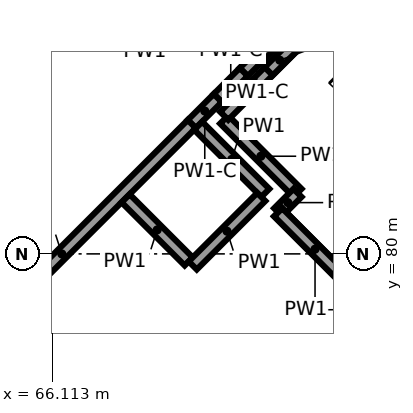
"""IFC4 building model, lengths in metres.
Left out: names, types, materials, properties, quantities, classifications, styles, units other than length and angle.
Written with IfcOpenShell. Run it as: python <this file> out.ifc"""

import sys

from ifc_helpers import new_model, si_unit, direction, frame, frame_2d, origin, place, context, subcontext, project, spatial, rectangle, extrude, element, save


model = new_model("IFC4")
c1 = context("Model", 3, precision=1e-05, world=origin(), true_north=direction((0.0, 1.0)))
c2 = subcontext(c1, "Body", "Model", "MODEL_VIEW")
j1 = project(units=[si_unit("LENGTHUNIT", "METRE"), si_unit("PLANEANGLEUNIT", "RADIAN")], contexts=[c1])
p1 = place(None, origin())
s1 = spatial("IfcSite", under=j1, at=p1, CompositionType="ELEMENT")
p2 = place(p1, origin())
s2 = spatial("IfcBuilding", under=s1, at=p2, CompositionType="ELEMENT")
p3 = place(p2, frame((0.0, 0.0, -4.0)))
s3 = spatial("IfcBuildingStorey", under=s2, at=p3, CompositionType="ELEMENT", Elevation=-4.0)
p4 = place(p3, frame((68.976, 82.734, 0.0), z_axis=(0.0, 0.0, 1.0), x_axis=(-0.707359184083, -0.706854288163, 0.0)))
e1 = element("IfcWall", 1, at=p4, inside=s3, PredefinedType="PARTITIONING", context=c2, shape_type="SweptSolid", body=[
    extrude(rectangle(XDim=0.484, YDim=0.15, at=frame_2d((0.242, 0.0))), origin(), (0.0, 0.0, 1.0), 2.7),
])
p5 = place(p3, frame((68.634, 82.392, 0.0), z_axis=(0.0, 0.0, 1.0), x_axis=(-0.707106781187, -0.707106781187, 0.0)))
e2 = element("IfcWall", 2, at=p5, inside=s3, PredefinedType="PARTITIONING", context=c2, shape_type="SweptSolid", body=[
    extrude(rectangle(XDim=0.483, YDim=0.15, at=frame_2d((0.242, 0.0))), origin(), (0.0, 0.0, 1.0), 2.7),
])
p6 = place(p3, frame((68.292, 82.05, 0.0), z_axis=(0.0, 0.0, 1.0), x_axis=(-0.707106781187, -0.707106781187, 0.0)))
e3 = element("IfcWall", 3, at=p6, inside=s3, PredefinedType="PARTITIONING", context=c2, shape_type="SweptSolid", body=[
    extrude(rectangle(XDim=0.484, YDim=0.15, at=frame_2d((0.242, 0.0))), origin(), (0.0, 0.0, 1.0), 2.7),
])
p7 = place(p3, frame((67.95, 81.708, 0.0), z_axis=(0.0, 0.0, 1.0), x_axis=(-0.707106781187, -0.707106781187, 0.0)))
e4 = element("IfcWall", 4, at=p7, inside=s3, PredefinedType="PARTITIONING", context=c2, shape_type="SweptSolid", body=[
    extrude(rectangle(XDim=4.835, YDim=0.15, at=frame_2d((2.417, 0.0))), origin(), (0.0, 0.0, 1.0), 3.6),
])
p8 = place(p3, frame((68.918, 80.802, 0.0), z_axis=(0.0, 0.0, 1.0), x_axis=(-0.707106781187, 0.707106781187, 0.0)))
e5 = element("IfcWall", 5, at=p8, inside=s3, PredefinedType="PARTITIONING", context=c2, shape_type="SweptSolid", body=[
    extrude(rectangle(XDim=1.249, YDim=0.15, at=frame_2d((0.625, 0.0))), origin(), (0.0, 0.0, 1.0), 3.6),
])
p9 = place(p3, frame((67.08, 80.73, 0.0), z_axis=(0.0, 0.0, 1.0), x_axis=(0.707106781187, -0.707106781187, 0.0)))
e6 = element("IfcWall", 6, at=p9, inside=s3, PredefinedType="PARTITIONING", context=c2, shape_type="SweptSolid", body=[
    extrude(rectangle(XDim=1.174, YDim=0.15, at=frame_2d((0.587, 0.0))), origin(), (0.0, 0.0, 1.0), 3.6),
])
p10 = place(p3, frame((67.963, 79.847, 0.0), z_axis=(0.0, 0.0, 1.0), x_axis=(0.707202523759, 0.707011025648, 0.0)))
e7 = element("IfcWall", 7, at=p10, inside=s3, PredefinedType="PARTITIONING", context=c2, shape_type="SweptSolid", body=[
    extrude(rectangle(XDim=1.275, YDim=0.15, at=frame_2d((0.637, 0.0))), origin(), (0.0, 0.0, 1.0), 3.6),
])
p11 = place(p3, frame((68.377, 81.767, 0.0), z_axis=(0.0, 0.0, 1.0), x_axis=(0.707106781187, -0.707106781187, 0.0)))
e8 = element("IfcWall", 8, at=p11, inside=s3, PredefinedType="PARTITIONING", context=c2, shape_type="SweptSolid", body=[
    extrude(rectangle(XDim=1.365, YDim=0.15, at=frame_2d((0.682, 0.0))), origin(), (0.0, 0.0, 1.0), 3.6),
])
p12 = place(p3, frame((69.342, 80.802, 0.0), z_axis=(0.0, 0.0, 1.0), x_axis=(-0.705750875464, -0.708460091877, 0.0)))
e9 = element("IfcWall", 9, at=p12, inside=s3, PredefinedType="PARTITIONING", context=c2, shape_type="SweptSolid", body=[
    extrude(rectangle(XDim=0.36, YDim=0.15, at=frame_2d((0.18, 0.0))), origin(), (0.0, 0.0, 1.0), 3.6),
])
p13 = place(p3, frame((69.087, 80.547, 0.0), z_axis=(0.0, 0.0, 1.0), x_axis=(0.707077113823, -0.707136447306, 0.0)))
e10 = element("IfcWall", 10, at=p13, inside=s3, PredefinedType="PARTITIONING", context=c2, shape_type="SweptSolid", body=[
    extrude(rectangle(XDim=4.115, YDim=0.15, at=frame_2d((2.057, 0.0))), origin(), (0.0, 0.0, 1.0), 2.5),
])
p14 = place(p3, frame((69.087, 80.547, 2.5), z_axis=(0.0, 0.0, 1.0), x_axis=(0.707017775362, -0.707195775809, 0.0)))
e11 = element("IfcWall", 11, at=p14, inside=s3, PredefinedType="PARTITIONING", context=c2, shape_type="SweptSolid", body=[
    extrude(rectangle(XDim=1.372, YDim=0.15, at=frame_2d((0.686, 0.0))), origin(), (0.0, 0.0, 1.0), 1.1),
])
p15 = place(p3, frame((69.84, 83.28, 0.0), z_axis=(0.0, 0.0, 1.0), x_axis=(-0.707165768196, -0.707047789256, 0.0)))
e12 = element("IfcWall", 12, at=p15, inside=s3, PredefinedType="PARTITIONING", context=c2, shape_type="SweptSolid", body=[
    extrude(rectangle(XDim=2.069, YDim=0.15, at=frame_2d((1.035, 0.0))), origin(), (0.0, 0.0, 1.0), 2.7),
])
p16 = place(p3, frame((69.84, 83.28, 2.7), z_axis=(0.0, 0.0, 1.0), x_axis=(-0.707205106539, -0.70700844216, 0.0)))
e13 = element("IfcWall", 13, at=p16, inside=s3, PredefinedType="PARTITIONING", context=c2, shape_type="SweptSolid", body=[
    extrude(rectangle(XDim=1.241, YDim=0.15, at=frame_2d((0.621, 0.0))), origin(), (0.0, 0.0, 1.0), 0.9),
])
save(model, sys.argv[1])
